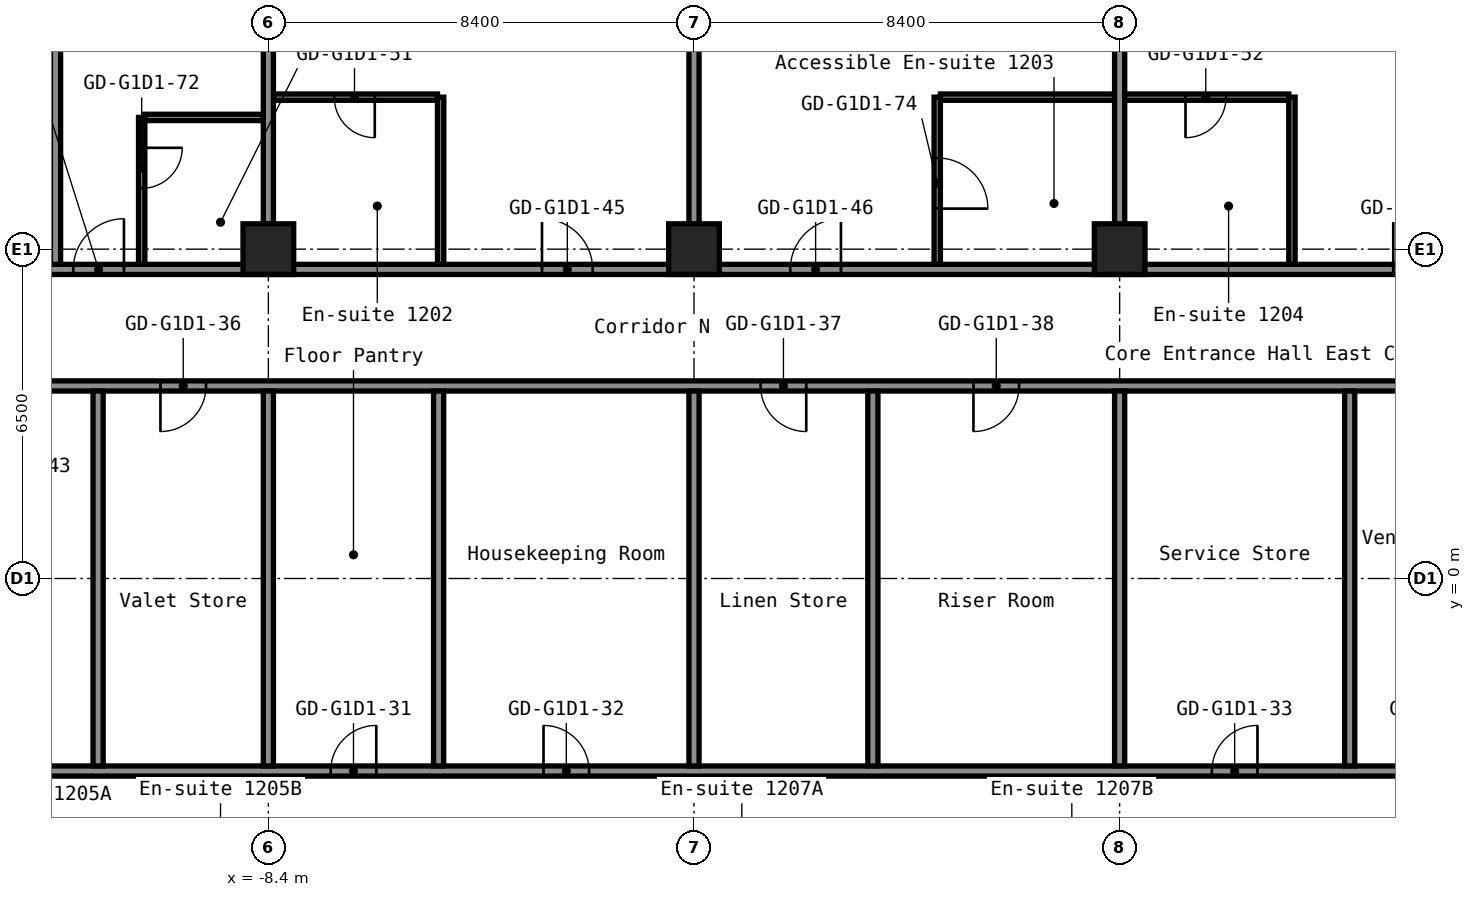
"""IFC4 building model, lengths in metres.
Left out: names, types, materials, properties, quantities, classifications, styles, units other than length and angle.
Written with IfcOpenShell. Run it as: python <this file> out.ifc"""

import sys

from ifc_helpers import new_model, si_unit, direction, frame, frame_2d, origin, origin_2d, place, context, subcontext, project, spatial, rectangle, hollow_rectangle, extrude, element, fill, save


model = new_model("IFC4")
c1 = context("Model", 3, precision=1e-05, world=origin(), true_north=direction((0.0, 1.0)))
c2 = subcontext(c1, "Body", "Model", "MODEL_VIEW")
j1 = project(units=[si_unit("LENGTHUNIT", "METRE"), si_unit("PLANEANGLEUNIT", "RADIAN")], contexts=[c1])
p1 = place(None, origin())
s1 = spatial("IfcSite", under=j1, at=p1, CompositionType="ELEMENT")
p2 = place(p1, origin())
s2 = spatial("IfcBuilding", under=s1, at=p2, CompositionType="ELEMENT")
p3 = place(p2, frame((0.0, 0.0, 45.4)))
s3 = spatial("IfcBuildingStorey", under=s2, at=p3, CompositionType="ELEMENT", Elevation=45.4)
for number, where, z_axis, x_axis in (
    (1, (-8.4, 6.5, 0.0), (0.0, 0.0, 1.0), (1.0, 0.0, 0.0)),
    (2, (0.0, 6.5, 0.0), (0.0, 0.0, 1.0), (1.0, 0.0, 0.0)),
    (3, (8.4, 6.5, 0.0), (0.0, 0.0, 1.0), (1.0, 0.0, 0.0)),
):
    element("IfcColumn", number, at=place(p3, frame(where, z_axis=z_axis, x_axis=x_axis)), inside=s3, PredefinedType="COLUMN", context=c2, shape_type="SweptSolid", body=[
        extrude(hollow_rectangle(XDim=1.0, YDim=1.0, WallThickness=0.04, at=origin_2d()), origin(), (0.0, 0.0, 1.0), 2.8),
    ])
p4 = place(p3, frame((-16.8, -3.8, 0.0), z_axis=(0.0, 0.0, 1.0), x_axis=(1.0, 0.0, 0.0)))
e4 = element("IfcWall", 4, at=p4, inside=s3, PredefinedType="PARTITIONING", context=c2, shape_type="SweptSolid", body=[
    extrude(rectangle(XDim=33.6, YDim=0.2, at=frame_2d((16.8, 0.0))), origin(), (0.0, 0.0, 1.0), 2.8),
])
p5 = place(p4, frame((9.63, 0.0, 0.0)))
e5 = element("IfcOpeningElement", 5, at=p5, cuts=e4, PredefinedType="OPENING", context=c2, shape_type="SweptSolid", body=[
    extrude(rectangle(XDim=0.9, YDim=2.1, at=frame_2d((0.45, 1.05))), frame((0.0, 0.11, 0.0), z_axis=(0.0, -1.0, 0.0), x_axis=(1.0, 0.0, 0.0)), (0.0, 0.0, 1.0), 0.22),
])
p6 = place(p4, frame((13.83, 0.0, 0.0)))
e6 = element("IfcOpeningElement", 6, at=p6, cuts=e4, PredefinedType="OPENING", context=c2, shape_type="SweptSolid", body=[
    extrude(rectangle(XDim=0.9, YDim=2.1, at=frame_2d((0.45, 1.05))), frame((0.0, 0.11, 0.0), z_axis=(0.0, -1.0, 0.0), x_axis=(1.0, 0.0, 0.0)), (0.0, 0.0, 1.0), 0.22),
])
p7 = place(p4, frame((27.02, 0.0, 0.0)))
e7 = element("IfcOpeningElement", 7, at=p7, cuts=e4, PredefinedType="OPENING", context=c2, shape_type="SweptSolid", body=[
    extrude(rectangle(XDim=0.9, YDim=2.1, at=frame_2d((0.45, 1.05))), frame((0.0, 0.11, 0.0), z_axis=(0.0, -1.0, 0.0), x_axis=(1.0, 0.0, 0.0)), (0.0, 0.0, 1.0), 0.22),
])
p8 = place(p4, frame((31.22, 0.0, 0.0)))
e8 = element("IfcOpeningElement", 8, at=p8, cuts=e4, PredefinedType="OPENING", context=c2, shape_type="SweptSolid", body=[
    extrude(rectangle(XDim=0.9, YDim=2.1, at=frame_2d((0.45, 1.05))), frame((0.0, 0.11, 0.0), z_axis=(0.0, -1.0, 0.0), x_axis=(1.0, 0.0, 0.0)), (0.0, 0.0, 1.0), 0.22),
])
p9 = place(p3, frame((-16.8, 3.8, 0.0), z_axis=(0.0, 0.0, 1.0), x_axis=(1.0, 0.0, 0.0)))
e9 = element("IfcWall", 9, at=p9, inside=s3, PredefinedType="PARTITIONING", context=c2, shape_type="SweptSolid", body=[
    extrude(rectangle(XDim=33.6, YDim=0.2, at=frame_2d((16.8, 0.0))), origin(), (0.0, 0.0, 1.0), 2.8),
])
p10 = place(p9, frame((2.07, 0.0, 0.0)))
e10 = element("IfcOpeningElement", 10, at=p10, cuts=e9, PredefinedType="OPENING", context=c2, shape_type="SweptSolid", body=[
    extrude(rectangle(XDim=0.9, YDim=2.1, at=frame_2d((0.45, 1.05))), frame((0.0, 0.11, 0.0), z_axis=(0.0, -1.0, 0.0), x_axis=(1.0, 0.0, 0.0)), (0.0, 0.0, 1.0), 0.22),
])
p11 = place(p9, frame((6.27, 0.0, 0.0)))
e11 = element("IfcOpeningElement", 11, at=p11, cuts=e9, PredefinedType="OPENING", context=c2, shape_type="SweptSolid", body=[
    extrude(rectangle(XDim=0.9, YDim=2.1, at=frame_2d((0.45, 1.05))), frame((0.0, 0.11, 0.0), z_axis=(0.0, -1.0, 0.0), x_axis=(1.0, 0.0, 0.0)), (0.0, 0.0, 1.0), 0.22),
])
p12 = place(p9, frame((18.115, 0.0, 0.0)))
e12 = element("IfcOpeningElement", 12, at=p12, cuts=e9, PredefinedType="OPENING", context=c2, shape_type="SweptSolid", body=[
    extrude(rectangle(XDim=0.9, YDim=2.1, at=frame_2d((0.45, 1.05))), frame((0.0, 0.11, 0.0), z_axis=(0.0, -1.0, 0.0), x_axis=(1.0, 0.0, 0.0)), (0.0, 0.0, 1.0), 0.22),
])
p13 = place(p9, frame((22.315, 0.0, 0.0)))
e13 = element("IfcOpeningElement", 13, at=p13, cuts=e9, PredefinedType="OPENING", context=c2, shape_type="SweptSolid", body=[
    extrude(rectangle(XDim=0.9, YDim=2.1, at=frame_2d((0.45, 1.05))), frame((0.0, 0.11, 0.0), z_axis=(0.0, -1.0, 0.0), x_axis=(1.0, 0.0, 0.0)), (0.0, 0.0, 1.0), 0.22),
])
p14 = place(p3, frame((-16.8, 6.1, 0.0), z_axis=(0.0, 0.0, 1.0), x_axis=(1.0, 0.0, 0.0)))
e14 = element("IfcWall", 14, at=p14, inside=s3, PredefinedType="PARTITIONING", context=c2, shape_type="SweptSolid", body=[
    extrude(rectangle(XDim=33.6, YDim=0.2, at=frame_2d((16.8, 0.0))), origin(), (0.0, 0.0, 1.0), 2.8),
])
p15 = place(p14, frame((2.85, 0.0, 0.0)))
e15 = element("IfcOpeningElement", 15, at=p15, cuts=e14, PredefinedType="OPENING", context=c2, shape_type="SweptSolid", body=[
    extrude(rectangle(XDim=1.0, YDim=2.1, at=frame_2d((0.5, 1.05))), frame((0.0, 0.11, 0.0), z_axis=(0.0, -1.0, 0.0), x_axis=(1.0, 0.0, 0.0)), (0.0, 0.0, 1.0), 0.22),
])
p16 = place(p14, frame((4.55, 0.0, 0.0)))
e16 = element("IfcOpeningElement", 16, at=p16, cuts=e14, PredefinedType="OPENING", context=c2, shape_type="SweptSolid", body=[
    extrude(rectangle(XDim=1.0, YDim=2.1, at=frame_2d((0.5, 1.05))), frame((0.0, 0.11, 0.0), z_axis=(0.0, -1.0, 0.0), x_axis=(1.0, 0.0, 0.0)), (0.0, 0.0, 1.0), 0.22),
])
p17 = place(p14, frame((13.8, 0.0, 0.0)))
e17 = element("IfcOpeningElement", 17, at=p17, cuts=e14, PredefinedType="OPENING", context=c2, shape_type="SweptSolid", body=[
    extrude(rectangle(XDim=1.0, YDim=2.1, at=frame_2d((0.5, 1.05))), frame((0.0, 0.11, 0.0), z_axis=(0.0, -1.0, 0.0), x_axis=(1.0, 0.0, 0.0)), (0.0, 0.0, 1.0), 0.22),
])
p18 = place(p14, frame((18.7, 0.0, 0.0)))
e18 = element("IfcOpeningElement", 18, at=p18, cuts=e14, PredefinedType="OPENING", context=c2, shape_type="SweptSolid", body=[
    extrude(rectangle(XDim=1.0, YDim=2.1, at=frame_2d((0.5, 1.05))), frame((0.0, 0.11, 0.0), z_axis=(0.0, -1.0, 0.0), x_axis=(1.0, 0.0, 0.0)), (0.0, 0.0, 1.0), 0.22),
])
p19 = place(p14, frame((30.6, 0.0, 0.0)))
e19 = element("IfcOpeningElement", 19, at=p19, cuts=e14, PredefinedType="OPENING", context=c2, shape_type="SweptSolid", body=[
    extrude(rectangle(XDim=1.0, YDim=2.1, at=frame_2d((0.5, 1.05))), frame((0.0, 0.11, 0.0), z_axis=(0.0, -1.0, 0.0), x_axis=(1.0, 0.0, 0.0)), (0.0, 0.0, 1.0), 0.22),
])
p20 = place(p3, frame((-10.837, 9.1, 0.0), z_axis=(0.0, 0.0, 1.0), x_axis=(1.0, 0.0, 0.0)))
e20 = element("IfcWall", 20, at=p20, inside=s3, PredefinedType="PARTITIONING", context=c2, shape_type="SweptSolid", body=[
    extrude(rectangle(XDim=2.337, YDim=0.125, at=frame_2d((1.169, 0.0))), origin(), (0.0, 0.0, 1.0), 2.8),
])
p21 = place(p3, frame((-8.3, 9.5, 0.0), z_axis=(0.0, 0.0, 1.0), x_axis=(1.0, 0.0, 0.0)))
e21 = element("IfcWall", 21, at=p21, inside=s3, PredefinedType="PARTITIONING", context=c2, shape_type="SweptSolid", body=[
    extrude(rectangle(XDim=3.238, YDim=0.125, at=frame_2d((1.619, 0.0))), origin(), (0.0, 0.0, 1.0), 2.8),
])
p22 = place(p21, frame((1.2, 0.0, 0.0)))
e22 = element("IfcOpeningElement", 22, at=p22, cuts=e21, PredefinedType="OPENING", context=c2, shape_type="SweptSolid", body=[
    extrude(rectangle(XDim=0.8, YDim=2.1, at=frame_2d((0.4, 1.05))), frame((0.0, 0.073, 0.0), z_axis=(0.0, -1.0, 0.0), x_axis=(1.0, 0.0, 0.0)), (0.0, 0.0, 1.0), 0.145),
])
p23 = place(p3, frame((4.863, 9.5, 0.0), z_axis=(0.0, 0.0, 1.0), x_axis=(1.0, 0.0, 0.0)))
e23 = element("IfcWall", 23, at=p23, inside=s3, PredefinedType="PARTITIONING", context=c2, shape_type="SweptSolid", body=[
    extrude(rectangle(XDim=6.875, YDim=0.125, at=frame_2d((3.438, 0.0))), origin(), (0.0, 0.0, 1.0), 2.8),
])
p24 = place(p23, frame((4.837, 0.0, 0.0)))
e24 = element("IfcOpeningElement", 24, at=p24, cuts=e23, PredefinedType="OPENING", context=c2, shape_type="SweptSolid", body=[
    extrude(rectangle(XDim=0.8, YDim=2.1, at=frame_2d((0.4, 1.05))), frame((0.0, 0.073, 0.0), z_axis=(0.0, -1.0, 0.0), x_axis=(1.0, 0.0, 0.0)), (0.0, 0.0, 1.0), 0.145),
])
p25 = place(p3, frame((-12.6, 6.2, 0.0), z_axis=(0.0, 0.0, 1.0), x_axis=(0.0, 1.0, 0.0)))
e25 = element("IfcWall", 25, at=p25, inside=s3, PredefinedType="PARTITIONING", context=c2, shape_type="SweptSolid", body=[
    extrude(rectangle(XDim=14.1, YDim=0.2, at=frame_2d((7.05, 0.0))), origin(), (0.0, 0.0, 1.0), 2.8),
])
p26 = place(p3, frame((-11.76, -3.7, 0.0), z_axis=(0.0, 0.0, 1.0), x_axis=(0.0, 1.0, 0.0)))
e26 = element("IfcWall", 26, at=p26, inside=s3, PredefinedType="PARTITIONING", context=c2, shape_type="SweptSolid", body=[
    extrude(rectangle(XDim=7.4, YDim=0.2, at=frame_2d((3.7, 0.0))), origin(), (0.0, 0.0, 1.0), 2.8),
])
p27 = place(p3, frame((-10.9, 6.2, 0.0), z_axis=(0.0, 0.0, 1.0), x_axis=(0.0, 1.0, 0.0)))
e27 = element("IfcWall", 27, at=p27, inside=s3, PredefinedType="PARTITIONING", context=c2, shape_type="SweptSolid", body=[
    extrude(rectangle(XDim=2.9, YDim=0.125, at=frame_2d((1.45, 0.0))), origin(), (0.0, 0.0, 1.0), 2.8),
])
p28 = place(p27, frame((1.5, 0.0, 0.0)))
e28 = element("IfcOpeningElement", 28, at=p28, cuts=e27, PredefinedType="OPENING", context=c2, shape_type="SweptSolid", body=[
    extrude(rectangle(XDim=0.8, YDim=2.1, at=frame_2d((0.4, 1.05))), frame((0.0, 0.073, 0.0), z_axis=(0.0, -1.0, 0.0), x_axis=(1.0, 0.0, 0.0)), (0.0, 0.0, 1.0), 0.145),
])
p29 = place(p3, frame((-8.4, -3.7, 0.0), z_axis=(0.0, 0.0, 1.0), x_axis=(0.0, 1.0, 0.0)))
e29 = element("IfcWall", 29, at=p29, inside=s3, PredefinedType="PARTITIONING", context=c2, shape_type="SweptSolid", body=[
    extrude(rectangle(XDim=7.4, YDim=0.2, at=frame_2d((3.7, 0.0))), origin(), (0.0, 0.0, 1.0), 2.8),
])
p30 = place(p3, frame((-8.4, 6.99, 0.0), z_axis=(0.0, 0.0, 1.0), x_axis=(0.0, 1.0, 0.0)))
e30 = element("IfcWall", 30, at=p30, inside=s3, PredefinedType="PARTITIONING", context=c2, shape_type="SweptSolid", body=[
    extrude(rectangle(XDim=13.31, YDim=0.2, at=frame_2d((6.655, 0.0))), origin(), (0.0, 0.0, 1.0), 2.8),
])
p31 = place(p3, frame((-5.04, -3.7, 0.0), z_axis=(0.0, 0.0, 1.0), x_axis=(0.0, 1.0, 0.0)))
e31 = element("IfcWall", 31, at=p31, inside=s3, PredefinedType="PARTITIONING", context=c2, shape_type="SweptSolid", body=[
    extrude(rectangle(XDim=7.4, YDim=0.2, at=frame_2d((3.7, 0.0))), origin(), (0.0, 0.0, 1.0), 2.8),
])
p32 = place(p3, frame((-5.0, 6.2, 0.0), z_axis=(0.0, 0.0, 1.0), x_axis=(0.0, 1.0, 0.0)))
e32 = element("IfcWall", 32, at=p32, inside=s3, PredefinedType="PARTITIONING", context=c2, shape_type="SweptSolid", body=[
    extrude(rectangle(XDim=3.3, YDim=0.125, at=frame_2d((1.65, 0.0))), origin(), (0.0, 0.0, 1.0), 2.8),
])
p33 = place(p3, frame((0.0, -3.7, 0.0), z_axis=(0.0, 0.0, 1.0), x_axis=(0.0, 1.0, 0.0)))
e33 = element("IfcWall", 33, at=p33, inside=s3, PredefinedType="PARTITIONING", context=c2, shape_type="SweptSolid", body=[
    extrude(rectangle(XDim=7.4, YDim=0.2, at=frame_2d((3.7, 0.0))), origin(), (0.0, 0.0, 1.0), 2.8),
])
p34 = place(p3, frame((0.0, 6.99, 0.0), z_axis=(0.0, 0.0, 1.0), x_axis=(0.0, 1.0, 0.0)))
e34 = element("IfcWall", 34, at=p34, inside=s3, PredefinedType="PARTITIONING", context=c2, shape_type="SweptSolid", body=[
    extrude(rectangle(XDim=13.31, YDim=0.2, at=frame_2d((6.655, 0.0))), origin(), (0.0, 0.0, 1.0), 2.8),
])
p35 = place(p3, frame((3.53, -3.7, 0.0), z_axis=(0.0, 0.0, 1.0), x_axis=(0.0, 1.0, 0.0)))
e35 = element("IfcWall", 35, at=p35, inside=s3, PredefinedType="PARTITIONING", context=c2, shape_type="SweptSolid", body=[
    extrude(rectangle(XDim=7.4, YDim=0.2, at=frame_2d((3.7, 0.0))), origin(), (0.0, 0.0, 1.0), 2.8),
])
p36 = place(p3, frame((4.8, 6.2, 0.0), z_axis=(0.0, 0.0, 1.0), x_axis=(0.0, 1.0, 0.0)))
e36 = element("IfcWall", 36, at=p36, inside=s3, PredefinedType="PARTITIONING", context=c2, shape_type="SweptSolid", body=[
    extrude(rectangle(XDim=3.3, YDim=0.125, at=frame_2d((1.65, 0.0))), origin(), (0.0, 0.0, 1.0), 2.8),
])
p37 = place(p36, frame((1.1, 0.0, 0.0)))
e37 = element("IfcOpeningElement", 37, at=p37, cuts=e36, PredefinedType="OPENING", context=c2, shape_type="SweptSolid", body=[
    extrude(rectangle(XDim=1.0, YDim=2.1, at=frame_2d((0.5, 1.05))), frame((0.0, 0.073, 0.0), z_axis=(0.0, -1.0, 0.0), x_axis=(1.0, 0.0, 0.0)), (0.0, 0.0, 1.0), 0.145),
])
p38 = place(p3, frame((8.4, -3.7, 0.0), z_axis=(0.0, 0.0, 1.0), x_axis=(0.0, 1.0, 0.0)))
e38 = element("IfcWall", 38, at=p38, inside=s3, PredefinedType="PARTITIONING", context=c2, shape_type="SweptSolid", body=[
    extrude(rectangle(XDim=7.4, YDim=0.2, at=frame_2d((3.7, 0.0))), origin(), (0.0, 0.0, 1.0), 2.8),
])
p39 = place(p3, frame((8.4, 6.99, 0.0), z_axis=(0.0, 0.0, 1.0), x_axis=(0.0, 1.0, 0.0)))
e39 = element("IfcWall", 39, at=p39, inside=s3, PredefinedType="PARTITIONING", context=c2, shape_type="SweptSolid", body=[
    extrude(rectangle(XDim=13.31, YDim=0.2, at=frame_2d((6.655, 0.0))), origin(), (0.0, 0.0, 1.0), 2.8),
])
p40 = place(p3, frame((11.8, 6.2, 0.0), z_axis=(0.0, 0.0, 1.0), x_axis=(0.0, 1.0, 0.0)))
e40 = element("IfcWall", 40, at=p40, inside=s3, PredefinedType="PARTITIONING", context=c2, shape_type="SweptSolid", body=[
    extrude(rectangle(XDim=3.3, YDim=0.125, at=frame_2d((1.65, 0.0))), origin(), (0.0, 0.0, 1.0), 2.8),
])
p41 = place(p3, frame((12.94, -3.7, 0.0), z_axis=(0.0, 0.0, 1.0), x_axis=(0.0, 1.0, 0.0)))
e41 = element("IfcWall", 41, at=p41, inside=s3, PredefinedType="PARTITIONING", context=c2, shape_type="SweptSolid", body=[
    extrude(rectangle(XDim=7.4, YDim=0.2, at=frame_2d((3.7, 0.0))), origin(), (0.0, 0.0, 1.0), 2.8),
])
p42 = place(p5, origin())
e42 = element("IfcDoor", 42, at=p42, inside=s3, OperationType="SINGLE_SWING_LEFT", PredefinedType="DOOR", context=c2, shape_type="SweptSolid", body=[
    extrude(rectangle(XDim=0.9, YDim=2.1, at=frame_2d((0.45, 1.05))), frame((0.0, 0.025, 0.0), z_axis=(0.0, -1.0, 0.0), x_axis=(1.0, 0.0, 0.0)), (0.0, 0.0, 1.0), 0.05),
])
fill(e5, e42)
p43 = place(p6, origin())
e43 = element("IfcDoor", 43, at=p43, inside=s3, OperationType="SINGLE_SWING_RIGHT", PredefinedType="DOOR", context=c2, shape_type="SweptSolid", body=[
    extrude(rectangle(XDim=0.9, YDim=2.1, at=frame_2d((0.45, 1.05))), frame((0.0, 0.025, 0.0), z_axis=(0.0, -1.0, 0.0), x_axis=(1.0, 0.0, 0.0)), (0.0, 0.0, 1.0), 0.05),
])
fill(e6, e43)
p44 = place(p7, origin())
e44 = element("IfcDoor", 44, at=p44, inside=s3, OperationType="SINGLE_SWING_LEFT", PredefinedType="DOOR", context=c2, shape_type="SweptSolid", body=[
    extrude(rectangle(XDim=0.9, YDim=2.1, at=frame_2d((0.45, 1.05))), frame((0.0, 0.025, 0.0), z_axis=(0.0, -1.0, 0.0), x_axis=(1.0, 0.0, 0.0)), (0.0, 0.0, 1.0), 0.05),
])
fill(e7, e44)
p45 = place(p11, origin())
e45 = element("IfcDoor", 45, at=p45, inside=s3, OperationType="SINGLE_SWING_LEFT", PredefinedType="DOOR", context=c2, shape_type="SweptSolid", body=[
    extrude(rectangle(XDim=0.9, YDim=2.1, at=frame_2d((0.45, 1.05))), frame((0.0, 0.025, 0.0), z_axis=(0.0, -1.0, 0.0), x_axis=(1.0, 0.0, 0.0)), (0.0, 0.0, 1.0), 0.05),
])
fill(e11, e45)
p46 = place(p12, origin())
e46 = element("IfcDoor", 46, at=p46, inside=s3, OperationType="SINGLE_SWING_RIGHT", PredefinedType="DOOR", context=c2, shape_type="SweptSolid", body=[
    extrude(rectangle(XDim=0.9, YDim=2.1, at=frame_2d((0.45, 1.05))), frame((0.0, 0.025, 0.0), z_axis=(0.0, -1.0, 0.0), x_axis=(1.0, 0.0, 0.0)), (0.0, 0.0, 1.0), 0.05),
])
fill(e12, e46)
p47 = place(p13, origin())
e47 = element("IfcDoor", 47, at=p47, inside=s3, OperationType="SINGLE_SWING_LEFT", PredefinedType="DOOR", context=c2, shape_type="SweptSolid", body=[
    extrude(rectangle(XDim=0.9, YDim=2.1, at=frame_2d((0.45, 1.05))), frame((0.0, 0.025, 0.0), z_axis=(0.0, -1.0, 0.0), x_axis=(1.0, 0.0, 0.0)), (0.0, 0.0, 1.0), 0.05),
])
fill(e13, e47)
p48 = place(p16, origin())
e48 = element("IfcDoor", 48, at=p48, inside=s3, OperationType="SINGLE_SWING_LEFT", PredefinedType="DOOR", context=c2, shape_type="SweptSolid", body=[
    extrude(rectangle(XDim=1.0, YDim=2.1, at=frame_2d((0.5, 1.05))), frame((0.0, 0.025, 0.0), z_axis=(0.0, -1.0, 0.0), x_axis=(1.0, 0.0, 0.0)), (0.0, 0.0, 1.0), 0.05),
])
fill(e16, e48)
p49 = place(p17, origin())
e49 = element("IfcDoor", 49, at=p49, inside=s3, OperationType="SINGLE_SWING_RIGHT", PredefinedType="DOOR", context=c2, shape_type="SweptSolid", body=[
    extrude(rectangle(XDim=1.0, YDim=2.1, at=frame_2d((0.5, 1.05))), frame((0.0, 0.025, 0.0), z_axis=(0.0, -1.0, 0.0), x_axis=(1.0, 0.0, 0.0)), (0.0, 0.0, 1.0), 0.05),
])
fill(e17, e49)
p50 = place(p18, origin())
e50 = element("IfcDoor", 50, at=p50, inside=s3, OperationType="SINGLE_SWING_LEFT", PredefinedType="DOOR", context=c2, shape_type="SweptSolid", body=[
    extrude(rectangle(XDim=1.0, YDim=2.1, at=frame_2d((0.5, 1.05))), frame((0.0, 0.025, 0.0), z_axis=(0.0, -1.0, 0.0), x_axis=(1.0, 0.0, 0.0)), (0.0, 0.0, 1.0), 0.05),
])
fill(e18, e50)
p51 = place(p19, origin())
e51 = element("IfcDoor", 51, at=p51, inside=s3, OperationType="SINGLE_SWING_RIGHT", PredefinedType="DOOR", context=c2, shape_type="SweptSolid", body=[
    extrude(rectangle(XDim=1.0, YDim=2.1, at=frame_2d((0.5, 1.05))), frame((0.0, 0.025, 0.0), z_axis=(0.0, -1.0, 0.0), x_axis=(1.0, 0.0, 0.0)), (0.0, 0.0, 1.0), 0.05),
])
fill(e19, e51)
p52 = place(p22, origin())
e52 = element("IfcDoor", 52, at=p52, inside=s3, OperationType="SINGLE_SWING_RIGHT", PredefinedType="DOOR", context=c2, shape_type="SweptSolid", body=[
    extrude(rectangle(XDim=0.8, YDim=2.1, at=frame_2d((0.4, 1.05))), frame((0.0, 0.025, 0.0), z_axis=(0.0, -1.0, 0.0), x_axis=(1.0, 0.0, 0.0)), (0.0, 0.0, 1.0), 0.05),
])
fill(e22, e52)
p53 = place(p24, origin())
e53 = element("IfcDoor", 53, at=p53, inside=s3, OperationType="SINGLE_SWING_LEFT", PredefinedType="DOOR", context=c2, shape_type="SweptSolid", body=[
    extrude(rectangle(XDim=0.8, YDim=2.1, at=frame_2d((0.4, 1.05))), frame((0.0, 0.025, 0.0), z_axis=(0.0, -1.0, 0.0), x_axis=(1.0, 0.0, 0.0)), (0.0, 0.0, 1.0), 0.05),
])
fill(e24, e53)
p54 = place(p28, origin())
e54 = element("IfcDoor", 54, at=p54, inside=s3, OperationType="SINGLE_SWING_RIGHT", PredefinedType="DOOR", context=c2, shape_type="SweptSolid", body=[
    extrude(rectangle(XDim=0.8, YDim=2.1, at=frame_2d((0.4, 1.05))), frame((0.0, 0.025, 0.0), z_axis=(0.0, -1.0, 0.0), x_axis=(1.0, 0.0, 0.0)), (0.0, 0.0, 1.0), 0.05),
])
fill(e28, e54)
p55 = place(p37, origin())
e55 = element("IfcDoor", 55, at=p55, inside=s3, OperationType="SINGLE_SWING_LEFT", PredefinedType="DOOR", context=c2, shape_type="SweptSolid", body=[
    extrude(rectangle(XDim=1.0, YDim=2.1, at=frame_2d((0.5, 1.05))), frame((0.0, 0.025, 0.0), z_axis=(0.0, -1.0, 0.0), x_axis=(1.0, 0.0, 0.0)), (0.0, 0.0, 1.0), 0.05),
])
fill(e37, e55)
save(model, sys.argv[1])
